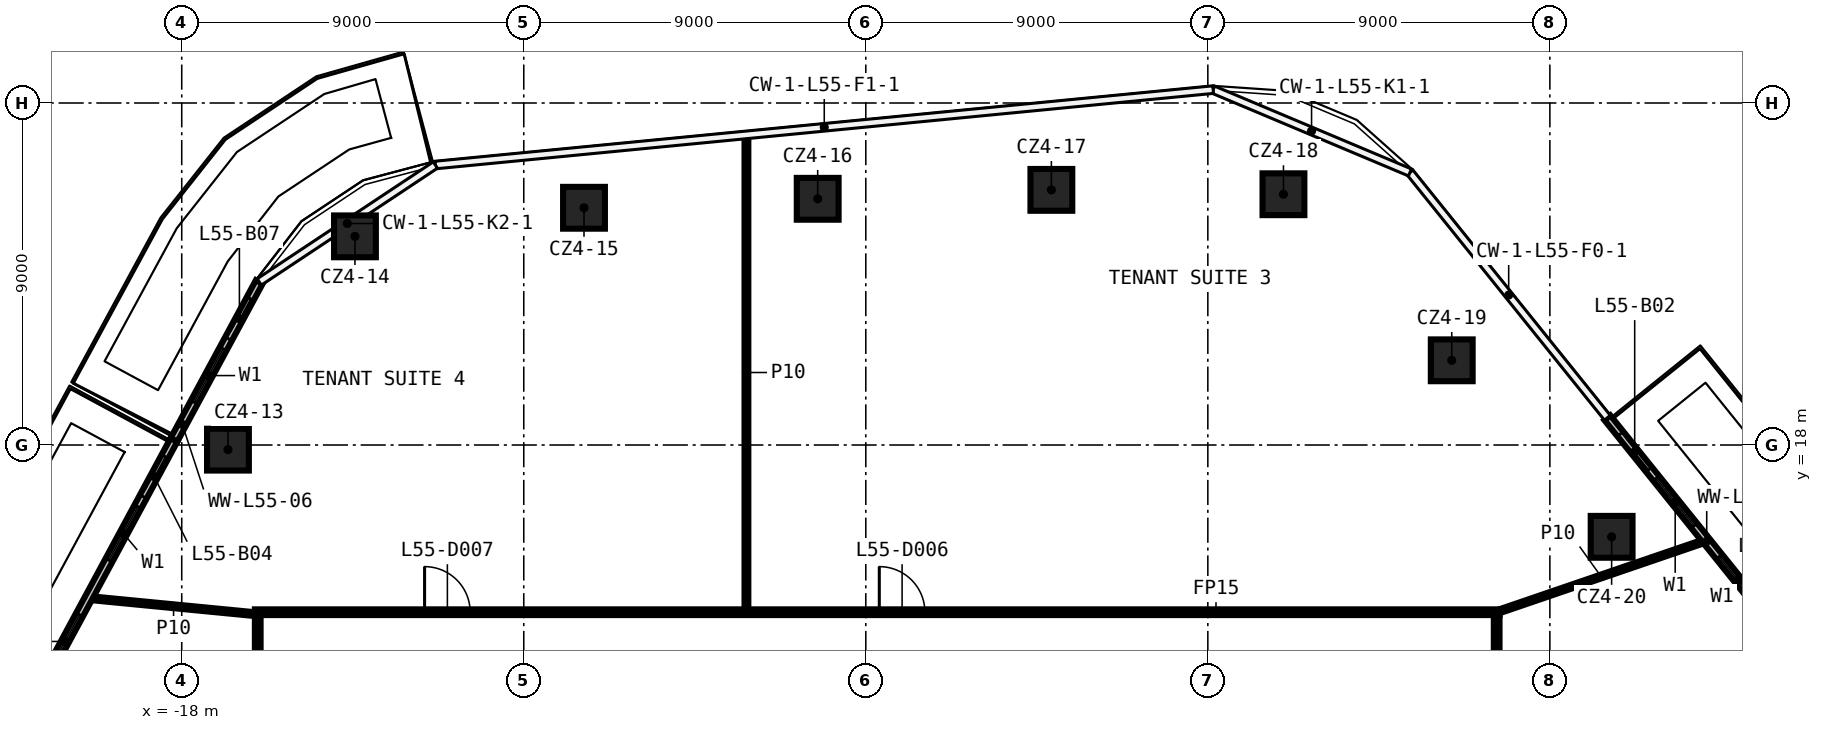
"""IFC4 building model, lengths in metres.
Left out: names, types, materials, properties, quantities, classifications, styles, units other than length and angle.
Written with IfcOpenShell. Run it as: python <this file> out.ifc"""

import sys

from ifc_helpers import new_model, si_unit, direction, frame, frame_2d, origin, origin_2d, place, context, subcontext, project, spatial, rectangle, extrude, element, fill, save


model = new_model("IFC4")
c1 = context("Model", 3, precision=1e-05, world=origin(), true_north=direction((0.0, 1.0)))
c2 = subcontext(c1, "Body", "Model", "MODEL_VIEW")
j1 = project(units=[si_unit("LENGTHUNIT", "METRE"), si_unit("PLANEANGLEUNIT", "RADIAN")], contexts=[c1])
p1 = place(None, origin())
s1 = spatial("IfcSite", under=j1, at=p1, CompositionType="ELEMENT")
p2 = place(p1, origin())
s2 = spatial("IfcBuilding", under=s1, at=p2, CompositionType="ELEMENT")
p3 = place(p2, frame((0.0, 0.0, 262.2)))
s3 = spatial("IfcBuildingStorey", under=s2, at=p3, CompositionType="ELEMENT", Elevation=262.2)
for number, where, z_axis, x_axis in (
    (1, (-16.784, 17.878, 0.0), (0.0, 0.0, 1.0), (1.0, 0.0, 0.0)),
    (2, (-13.442, 23.491, 0.0), (0.0, 0.0, 1.0), (1.0, 0.0, 0.0)),
    (3, (-7.415, 24.243, 0.0), (0.0, 0.0, 1.0), (1.0, 0.0, 0.0)),
    (4, (-1.266, 24.479, 0.0), (0.0, 0.0, 1.0), (1.0, 0.0, 0.0)),
    (5, (4.883, 24.714, 0.0), (0.0, 0.0, 1.0), (1.0, 0.0, 0.0)),
    (6, (10.99, 24.599, 0.0), (0.0, 0.0, 1.0), (1.0, 0.0, 0.0)),
    (7, (15.418, 20.229, 0.0), (0.0, 0.0, 1.0), (1.0, 0.0, 0.0)),
    (8, (19.625, 15.584, 0.0), (0.0, 0.0, 1.0), (1.0, 0.0, 0.0)),
):
    element("IfcColumn", number, at=place(p3, frame(where, z_axis=z_axis, x_axis=x_axis)), inside=s3, PredefinedType="COLUMN", context=c2, shape_type="SweptSolid", body=[
        extrude(rectangle(XDim=1.1, YDim=1.1, at=origin_2d()), origin(), (0.0, 0.0, 1.0), 3.82),
    ])
p4 = place(p3, frame((-16.075, 13.6, 0.0), z_axis=(0.0, 0.0, 1.0), x_axis=(1.0, 0.0, 0.0)))
e9 = element("IfcWall", 9, at=p4, inside=s3, PredefinedType="PARTITIONING", context=c2, shape_type="SweptSolid", body=[
    extrude(rectangle(XDim=32.75, YDim=0.15, at=frame_2d((16.375, 0.0))), origin(), (0.0, 0.0, 1.0), 3.82),
])
p5 = place(p4, frame((16.43, 0.0, 0.0)))
e10 = element("IfcOpeningElement", 10, at=p5, cuts=e9, PredefinedType="OPENING", context=c2, shape_type="SweptSolid", body=[
    extrude(rectangle(XDim=1.2, YDim=2.1, at=frame_2d((0.6, 1.05))), frame((0.0, 0.085, 0.0), z_axis=(0.0, -1.0, 0.0), x_axis=(1.0, 0.0, 0.0)), (0.0, 0.0, 1.0), 0.17),
])
p6 = place(p4, frame((4.465, 0.0, 0.0)))
e11 = element("IfcOpeningElement", 11, at=p6, cuts=e9, PredefinedType="OPENING", context=c2, shape_type="SweptSolid", body=[
    extrude(rectangle(XDim=1.2, YDim=2.1, at=frame_2d((0.6, 1.05))), frame((0.0, 0.085, 0.0), z_axis=(0.0, -1.0, 0.0), x_axis=(1.0, 0.0, 0.0)), (0.0, 0.0, 1.0), 0.17),
])
p7 = place(p3, frame((16.6, 13.6, 0.0), z_axis=(0.0, 0.0, 1.0), x_axis=(0.946142628781, 0.323750098073, 0.0)))
e12 = element("IfcWall", 12, at=p7, inside=s3, PredefinedType="PARTITIONING", context=c2, shape_type="SweptSolid", body=[
    extrude(rectangle(XDim=5.805, YDim=0.1, at=frame_2d((2.903, 0.0))), origin(), (0.0, 0.0, 1.0), 3.82),
])
p8 = place(p3, frame((16.6, 13.525, 0.0), z_axis=(0.0, 0.0, 1.0), x_axis=(0.0, -1.0, 0.0)))
e13 = element("IfcWall", 13, at=p8, inside=s3, PredefinedType="PARTITIONING", context=c2, shape_type="SweptSolid", body=[
    extrude(rectangle(XDim=27.05, YDim=0.15, at=frame_2d((13.525, 0.0))), origin(), (0.0, 0.0, 1.0), 3.82),
])
p9 = place(p8, frame((22.559, 0.0, 0.0)))
e14 = element("IfcOpeningElement", 14, at=p9, cuts=e13, PredefinedType="OPENING", context=c2, shape_type="SweptSolid", body=[
    extrude(rectangle(XDim=1.2, YDim=2.1, at=frame_2d((0.6, 1.05))), frame((0.0, 0.085, 0.0), z_axis=(0.0, -1.0, 0.0), x_axis=(1.0, 0.0, 0.0)), (0.0, 0.0, 1.0), 0.17),
])
p10 = place(p8, frame((11.036, 0.0, 0.0)))
e15 = element("IfcOpeningElement", 15, at=p10, cuts=e13, PredefinedType="OPENING", context=c2, shape_type="SweptSolid", body=[
    extrude(rectangle(XDim=1.2, YDim=2.1, at=frame_2d((0.6, 1.05))), frame((0.0, 0.085, 0.0), z_axis=(0.0, -1.0, 0.0), x_axis=(1.0, 0.0, 0.0)), (0.0, 0.0, 1.0), 0.17),
])
p11 = place(p3, frame((-3.141, 13.675, 0.0), z_axis=(0.0, 0.0, 1.0), x_axis=(0.0, 1.0, 0.0)))
e16 = element("IfcWall", 16, at=p11, inside=s3, PredefinedType="PARTITIONING", context=c2, shape_type="SweptSolid", body=[
    extrude(rectangle(XDim=12.466, YDim=0.1, at=frame_2d((6.233, 0.0))), origin(), (0.0, 0.0, 1.0), 3.82),
])
p12 = place(p3, frame((-16.0, 11.074, 0.0), z_axis=(0.0, 0.0, 1.0), x_axis=(0.0, 1.0, 0.0)))
e17 = element("IfcWall", 17, at=p12, inside=s3, PredefinedType="PARTITIONING", context=c2, shape_type="SweptSolid", body=[
    extrude(rectangle(XDim=2.451, YDim=0.15, at=frame_2d((1.226, 0.0))), origin(), (0.0, 0.0, 1.0), 3.82),
])
p13 = place(p3, frame((-20.43, 13.972, 0.0), z_axis=(0.0, 0.0, 1.0), x_axis=(0.995312443594, -0.096711631286, 0.0)))
e18 = element("IfcWall", 18, at=p13, inside=s3, PredefinedType="PARTITIONING", context=c2, shape_type="SweptSolid", body=[
    extrude(rectangle(XDim=4.45, YDim=0.1, at=frame_2d((2.225, 0.0))), origin(), (0.0, 0.0, 1.0), 3.82),
])
p14 = place(p3, frame((24.712, 12.255, 0.0), z_axis=(0.0, 0.0, 1.0), x_axis=(-0.626871708653, 0.77912249415, 0.0)))
e19 = element("IfcWall", 19, at=p14, inside=s3, PredefinedType="SOLIDWALL", context=c2, shape_type="SweptSolid", body=[
    extrude(rectangle(XDim=8.293, YDim=0.2, at=frame_2d((4.147, 0.0))), origin(), (0.0, 0.0, 1.0), 3.82),
])
p15 = place(p14, frame((2.0, 0.0, 0.6)))
e20 = element("IfcOpeningElement", 20, at=p15, cuts=e19, PredefinedType="OPENING", context=c2, shape_type="SweptSolid", body=[
    extrude(rectangle(XDim=1.6, YDim=2.4, at=frame_2d((0.8, 1.2))), frame((0.0, 0.11, 0.0), z_axis=(0.0, -1.0, 0.0), x_axis=(1.0, 0.0, 0.0)), (0.0, 0.0, 1.0), 0.22),
])
p16 = place(p14, frame((0.5, 0.0, 0.0)))
e21 = element("IfcOpeningElement", 21, at=p16, cuts=e19, PredefinedType="OPENING", context=c2, shape_type="SweptSolid", body=[
    extrude(rectangle(XDim=1.2, YDim=2.4, at=frame_2d((0.6, 1.2))), frame((0.0, 0.11, 0.0), z_axis=(0.0, -1.0, 0.0), x_axis=(1.0, 0.0, 0.0)), (0.0, 0.0, 1.0), 0.22),
])
p17 = place(p14, frame((4.647, 0.0, 0.6)))
e22 = element("IfcOpeningElement", 22, at=p17, cuts=e19, PredefinedType="OPENING", context=c2, shape_type="SweptSolid", body=[
    extrude(rectangle(XDim=1.6, YDim=2.4, at=frame_2d((0.8, 1.2))), frame((0.0, 0.11, 0.0), z_axis=(0.0, -1.0, 0.0), x_axis=(1.0, 0.0, 0.0)), (0.0, 0.0, 1.0), 0.22),
])
p18 = place(p14, frame((6.547, 0.0, 0.0)))
e23 = element("IfcOpeningElement", 23, at=p18, cuts=e19, PredefinedType="OPENING", context=c2, shape_type="SweptSolid", body=[
    extrude(rectangle(XDim=1.2, YDim=2.4, at=frame_2d((0.6, 1.2))), frame((0.0, 0.11, 0.0), z_axis=(0.0, -1.0, 0.0), x_axis=(1.0, 0.0, 0.0)), (0.0, 0.0, 1.0), 0.22),
])
p19 = place(p3, frame((-18.204, 18.136, 0.0), z_axis=(0.0, 0.0, 1.0), x_axis=(-0.475207525375, -0.87987374539, 0.0)))
e24 = element("IfcWall", 24, at=p19, inside=s3, PredefinedType="SOLIDWALL", context=c2, shape_type="SweptSolid", body=[
    extrude(rectangle(XDim=14.19, YDim=0.2, at=frame_2d((7.095, 0.0))), origin(), (0.0, 0.0, 1.0), 3.82),
])
p20 = place(p19, frame((2.0, 0.0, 0.6)))
e25 = element("IfcOpeningElement", 25, at=p20, cuts=e24, PredefinedType="OPENING", context=c2, shape_type="SweptSolid", body=[
    extrude(rectangle(XDim=1.6, YDim=2.4, at=frame_2d((0.8, 1.2))), frame((0.0, 0.11, 0.0), z_axis=(0.0, -1.0, 0.0), x_axis=(1.0, 0.0, 0.0)), (0.0, 0.0, 1.0), 0.22),
])
p21 = place(p19, frame((0.5, 0.0, 0.0)))
e26 = element("IfcOpeningElement", 26, at=p21, cuts=e24, PredefinedType="OPENING", context=c2, shape_type="SweptSolid", body=[
    extrude(rectangle(XDim=1.2, YDim=2.4, at=frame_2d((0.6, 1.2))), frame((0.0, 0.11, 0.0), z_axis=(0.0, -1.0, 0.0), x_axis=(1.0, 0.0, 0.0)), (0.0, 0.0, 1.0), 0.22),
])
p22 = place(p19, frame((5.23, 0.0, 0.6)))
e27 = element("IfcOpeningElement", 27, at=p22, cuts=e24, PredefinedType="OPENING", context=c2, shape_type="SweptSolid", body=[
    extrude(rectangle(XDim=1.6, YDim=2.4, at=frame_2d((0.8, 1.2))), frame((0.0, 0.11, 0.0), z_axis=(0.0, -1.0, 0.0), x_axis=(1.0, 0.0, 0.0)), (0.0, 0.0, 1.0), 0.22),
])
p23 = place(p19, frame((7.13, 0.0, 0.0)))
e28 = element("IfcOpeningElement", 28, at=p23, cuts=e24, PredefinedType="OPENING", context=c2, shape_type="SweptSolid", body=[
    extrude(rectangle(XDim=1.2, YDim=2.4, at=frame_2d((0.6, 1.2))), frame((0.0, 0.11, 0.0), z_axis=(0.0, -1.0, 0.0), x_axis=(1.0, 0.0, 0.0)), (0.0, 0.0, 1.0), 0.22),
])
p24 = place(p19, frame((11.46, 0.0, 0.6)))
e29 = element("IfcOpeningElement", 29, at=p24, cuts=e24, PredefinedType="OPENING", context=c2, shape_type="SweptSolid", body=[
    extrude(rectangle(XDim=1.6, YDim=2.4, at=frame_2d((0.8, 1.2))), frame((0.0, 0.11, 0.0), z_axis=(0.0, -1.0, 0.0), x_axis=(1.0, 0.0, 0.0)), (0.0, 0.0, 1.0), 0.22),
])
p25 = place(p19, frame((9.96, 0.0, 0.0)))
e30 = element("IfcOpeningElement", 30, at=p25, cuts=e24, PredefinedType="OPENING", context=c2, shape_type="SweptSolid", body=[
    extrude(rectangle(XDim=1.2, YDim=2.4, at=frame_2d((0.6, 1.2))), frame((0.0, 0.11, 0.0), z_axis=(0.0, -1.0, 0.0), x_axis=(1.0, 0.0, 0.0)), (0.0, 0.0, 1.0), 0.22),
])
p26 = place(p3, frame((-15.96, 22.291, 0.0), z_axis=(0.0, 0.0, 1.0), x_axis=(-0.47520015235, -0.879877727418, 0.0)))
e31 = element("IfcWall", 31, at=p26, inside=s3, PredefinedType="SOLIDWALL", context=c2, shape_type="SweptSolid", body=[
    extrude(rectangle(XDim=4.722, YDim=0.2, at=frame_2d((2.361, 0.0))), origin(), (0.0, 0.0, 1.0), 3.82),
])
p27 = place(p26, frame((2.0, 0.0, 0.6)))
e32 = element("IfcOpeningElement", 32, at=p27, cuts=e31, PredefinedType="OPENING", context=c2, shape_type="SweptSolid", body=[
    extrude(rectangle(XDim=1.6, YDim=2.4, at=frame_2d((0.8, 1.2))), frame((0.0, 0.11, 0.0), z_axis=(0.0, -1.0, 0.0), x_axis=(1.0, 0.0, 0.0)), (0.0, 0.0, 1.0), 0.22),
])
p28 = place(p26, frame((0.5, 0.0, 0.0)))
e33 = element("IfcOpeningElement", 33, at=p28, cuts=e31, PredefinedType="OPENING", context=c2, shape_type="SweptSolid", body=[
    extrude(rectangle(XDim=1.2, YDim=2.4, at=frame_2d((0.6, 1.2))), frame((0.0, 0.11, 0.0), z_axis=(0.0, -1.0, 0.0), x_axis=(1.0, 0.0, 0.0)), (0.0, 0.0, 1.0), 0.22),
])
p29 = place(p5, origin())
e34 = element("IfcDoor", 34, at=p29, inside=s3, OperationType="SINGLE_SWING_LEFT", PredefinedType="DOOR", context=c2, shape_type="SweptSolid", body=[
    extrude(rectangle(XDim=1.2, YDim=2.1, at=frame_2d((0.6, 1.05))), frame((0.0, 0.025, 0.0), z_axis=(0.0, -1.0, 0.0), x_axis=(1.0, 0.0, 0.0)), (0.0, 0.0, 1.0), 0.05),
])
fill(e10, e34)
p30 = place(p6, origin())
e35 = element("IfcDoor", 35, at=p30, inside=s3, OperationType="SINGLE_SWING_RIGHT", PredefinedType="DOOR", context=c2, shape_type="SweptSolid", body=[
    extrude(rectangle(XDim=1.2, YDim=2.1, at=frame_2d((0.6, 1.05))), frame((0.0, 0.025, 0.0), z_axis=(0.0, -1.0, 0.0), x_axis=(1.0, 0.0, 0.0)), (0.0, 0.0, 1.0), 0.05),
])
fill(e11, e35)
p31 = place(p15, origin())
e36 = element("IfcWindow", 36, at=p31, inside=s3, PartitioningType="SINGLE_PANEL", PredefinedType="WINDOW", context=c2, shape_type="SweptSolid", body=[
    extrude(rectangle(XDim=1.6, YDim=2.4, at=frame_2d((0.8, 1.2))), frame((0.0, 0.03, 0.0), z_axis=(0.0, -1.0, 0.0), x_axis=(1.0, 0.0, 0.0)), (0.0, 0.0, 1.0), 0.06),
])
fill(e20, e36)
p32 = place(p17, origin())
e37 = element("IfcWindow", 37, at=p32, inside=s3, PartitioningType="SINGLE_PANEL", PredefinedType="WINDOW", context=c2, shape_type="SweptSolid", body=[
    extrude(rectangle(XDim=1.6, YDim=2.4, at=frame_2d((0.8, 1.2))), frame((0.0, 0.03, 0.0), z_axis=(0.0, -1.0, 0.0), x_axis=(1.0, 0.0, 0.0)), (0.0, 0.0, 1.0), 0.06),
])
fill(e22, e37)
p33 = place(p18, origin())
e38 = element("IfcDoor", 38, at=p33, inside=s3, OperationType="SLIDING_TO_LEFT", PredefinedType="DOOR", context=c2, shape_type="SweptSolid", body=[
    extrude(rectangle(XDim=1.2, YDim=2.4, at=frame_2d((0.6, 1.2))), frame((0.0, 0.025, 0.0), z_axis=(0.0, -1.0, 0.0), x_axis=(1.0, 0.0, 0.0)), (0.0, 0.0, 1.0), 0.05),
])
fill(e23, e38)
p34 = place(p20, origin())
e39 = element("IfcWindow", 39, at=p34, inside=s3, PartitioningType="SINGLE_PANEL", PredefinedType="WINDOW", context=c2, shape_type="SweptSolid", body=[
    extrude(rectangle(XDim=1.6, YDim=2.4, at=frame_2d((0.8, 1.2))), frame((0.0, 0.03, 0.0), z_axis=(0.0, -1.0, 0.0), x_axis=(1.0, 0.0, 0.0)), (0.0, 0.0, 1.0), 0.06),
])
fill(e25, e39)
p35 = place(p21, origin())
e40 = element("IfcDoor", 40, at=p35, inside=s3, OperationType="SLIDING_TO_LEFT", PredefinedType="DOOR", context=c2, shape_type="SweptSolid", body=[
    extrude(rectangle(XDim=1.2, YDim=2.4, at=frame_2d((0.6, 1.2))), frame((0.0, 0.025, 0.0), z_axis=(0.0, -1.0, 0.0), x_axis=(1.0, 0.0, 0.0)), (0.0, 0.0, 1.0), 0.05),
])
fill(e26, e40)
p36 = place(p22, origin())
e41 = element("IfcWindow", 41, at=p36, inside=s3, PartitioningType="SINGLE_PANEL", PredefinedType="WINDOW", context=c2, shape_type="SweptSolid", body=[
    extrude(rectangle(XDim=1.6, YDim=2.4, at=frame_2d((0.8, 1.2))), frame((0.0, 0.03, 0.0), z_axis=(0.0, -1.0, 0.0), x_axis=(1.0, 0.0, 0.0)), (0.0, 0.0, 1.0), 0.06),
])
fill(e27, e41)
p37 = place(p27, origin())
e42 = element("IfcWindow", 42, at=p37, inside=s3, PartitioningType="SINGLE_PANEL", PredefinedType="WINDOW", context=c2, shape_type="SweptSolid", body=[
    extrude(rectangle(XDim=1.6, YDim=2.4, at=frame_2d((0.8, 1.2))), frame((0.0, 0.03, 0.0), z_axis=(0.0, -1.0, 0.0), x_axis=(1.0, 0.0, 0.0)), (0.0, 0.0, 1.0), 0.06),
])
fill(e32, e42)
p38 = place(p28, origin())
e43 = element("IfcDoor", 43, at=p38, inside=s3, OperationType="SLIDING_TO_LEFT", PredefinedType="DOOR", context=c2, shape_type="SweptSolid", body=[
    extrude(rectangle(XDim=1.2, YDim=2.4, at=frame_2d((0.6, 1.2))), frame((0.0, 0.025, 0.0), z_axis=(0.0, -1.0, 0.0), x_axis=(1.0, 0.0, 0.0)), (0.0, 0.0, 1.0), 0.05),
])
fill(e33, e43)
save(model, sys.argv[1])
